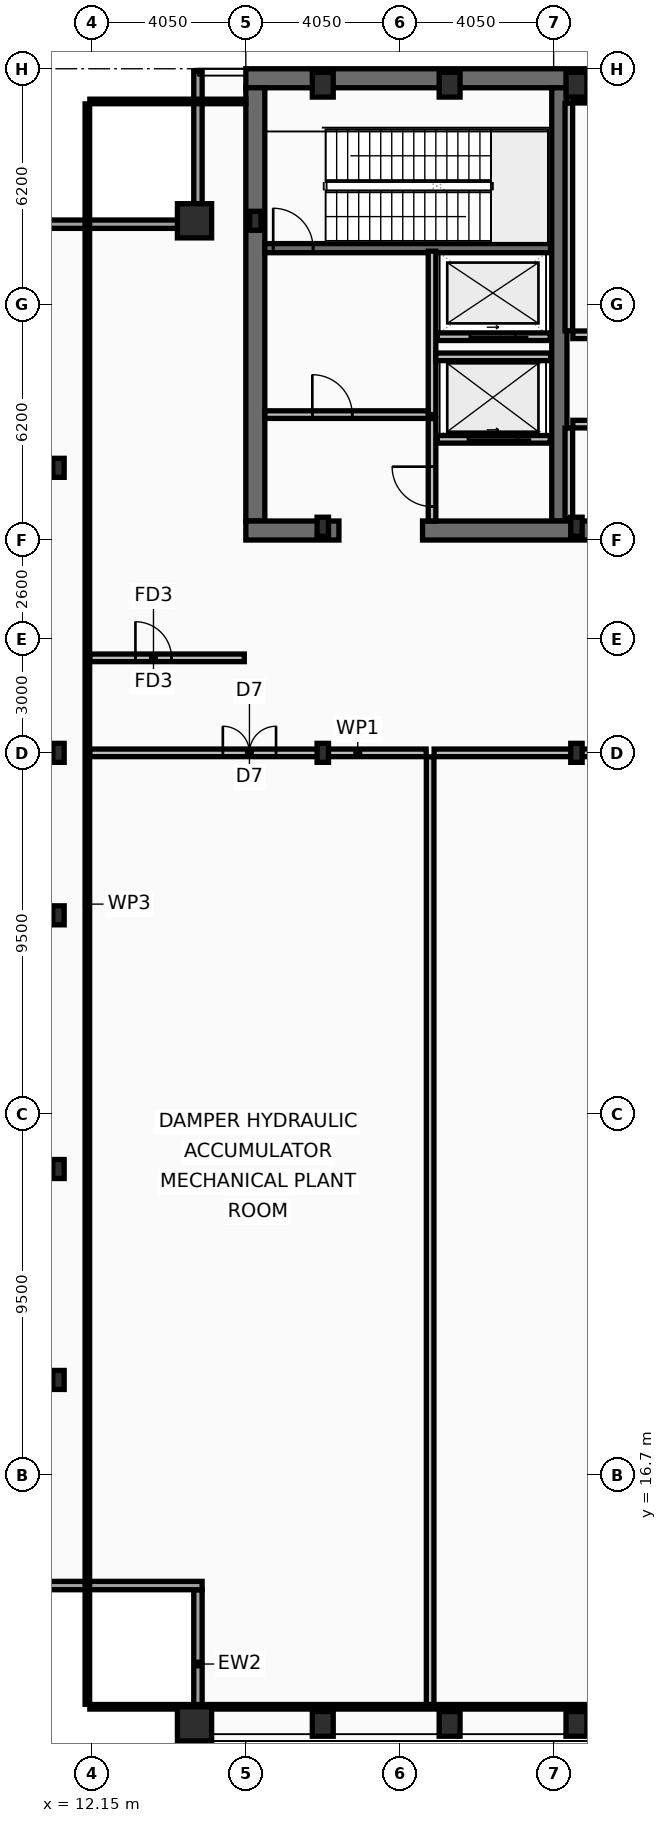
"""IFC4 building model, lengths in metres.
Left out: names, types, materials, properties, quantities, classifications, styles, units other than length and angle.
Written with IfcOpenShell. Run it as: python <this file> out.ifc"""

import sys

from ifc_helpers import new_model, si_unit, direction, frame, frame_2d, origin, origin_2d, place, context, subcontext, project, spatial, rectangle, hollow_rectangle, i_section, extrude, element, fill, save


model = new_model("IFC4")
c1 = context("Model", 3, precision=1e-05, world=origin(), true_north=direction((0.0, 1.0)))
c2 = subcontext(c1, "Body", "Model", "MODEL_VIEW")
j1 = project(units=[si_unit("LENGTHUNIT", "METRE"), si_unit("PLANEANGLEUNIT", "RADIAN")], contexts=[c1])
p1 = place(None, origin())
s1 = spatial("IfcSite", under=j1, at=p1, CompositionType="ELEMENT")
p2 = place(p1, origin())
s2 = spatial("IfcBuilding", under=s1, at=p2, CompositionType="ELEMENT")
p3 = place(p2, frame((0.0, 0.0, 356.2)))
s3 = spatial("IfcBuildingStorey", under=s2, at=p3, CompositionType="ELEMENT", Elevation=356.2)
p4 = place(p3, frame((16.2, 53.45, 0.0), z_axis=(0.0, 0.0, 1.0), x_axis=(1.0, 0.0, 0.0)))
e1 = element("IfcWall", 1, at=p4, inside=s3, PredefinedType="SHEAR", context=c2, shape_type="SweptSolid", body=[
    extrude(rectangle(XDim=40.5, YDim=0.5, at=frame_2d((20.25, 0.0))), origin(), (0.0, 0.0, 1.0), 5.4),
])
p5 = place(p3, frame((16.45, 41.8, 0.0), z_axis=(0.0, 0.0, 1.0), x_axis=(0.0, 1.0, 0.0)))
e2 = element("IfcWall", 2, at=p5, inside=s3, PredefinedType="SHEAR", context=c2, shape_type="SweptSolid", body=[
    extrude(rectangle(XDim=11.4, YDim=0.5, at=frame_2d((5.7, 0.0))), origin(), (0.0, 0.0, 1.0), 5.4),
])
p6 = place(p3, frame((24.45, 41.8, 0.0), z_axis=(0.0, 0.0, 1.0), x_axis=(0.0, 1.0, 0.0)))
e3 = element("IfcWall", 3, at=p6, inside=s3, PredefinedType="SHEAR", context=c2, shape_type="SweptSolid", body=[
    extrude(rectangle(XDim=11.4, YDim=0.4, at=frame_2d((5.7, 0.0))), origin(), (0.0, 0.0, 1.0), 5.4),
])
p7 = place(p3, frame((18.65, 41.55, 0.0), z_axis=(0.0, 0.0, 1.0), x_axis=(-1.0, 0.0, 0.0)))
e4 = element("IfcWall", 4, at=p7, inside=s3, PredefinedType="SHEAR", context=c2, shape_type="SweptSolid", body=[
    extrude(rectangle(XDim=2.45, YDim=0.5, at=frame_2d((1.225, 0.0))), origin(), (0.0, 0.0, 1.0), 5.4),
])
p8 = place(p3, frame((32.3, 41.55, 0.0), z_axis=(0.0, 0.0, 1.0), x_axis=(-1.0, 0.0, 0.0)))
e5 = element("IfcWall", 5, at=p8, inside=s3, PredefinedType="SHEAR", context=c2, shape_type="SweptSolid", body=[
    extrude(rectangle(XDim=11.45, YDim=0.5, at=frame_2d((5.725, 0.0))), origin(), (0.0, 0.0, 1.0), 5.4),
])
p9 = place(p3, frame((16.7, 48.98, 0.0), z_axis=(0.0, 0.0, 1.0), x_axis=(1.0, 0.0, 0.0)))
e6 = element("IfcWall", 6, at=p9, inside=s3, PredefinedType="SHEAR", context=c2, shape_type="SweptSolid", body=[
    extrude(rectangle(XDim=7.52, YDim=0.24, at=frame_2d((3.76, 0.0))), origin(), (0.0, 0.0, 1.0), 5.4),
])
p10 = place(p9, frame((0.22, 0.0, 0.0)))
e7 = element("IfcOpeningElement", 7, at=p10, cuts=e6, PredefinedType="OPENING", context=c2, shape_type="SweptSolid", body=[
    extrude(rectangle(XDim=1.05, YDim=2.15, at=frame_2d((0.525, 1.075))), frame((0.0, 0.13, 0.0), z_axis=(0.0, -1.0, 0.0), x_axis=(1.0, 0.0, 0.0)), (0.0, 0.0, 1.0), 0.26),
])
for number, where, z_axis, x_axis in (
    (8, (14.85, 10.15, 0.0), (0.0, 0.0, 1.0), (1.0, 0.0, 0.0)),
    (9, (14.85, 49.7, 0.0), (0.0, 0.0, 1.0), (1.0, 0.0, 0.0)),
):
    element("IfcColumn", number, at=place(p3, frame(where, z_axis=z_axis, x_axis=x_axis)), inside=s3, PredefinedType="COLUMN", context=c2, shape_type="SweptSolid", body=[
        extrude(hollow_rectangle(XDim=0.9, YDim=0.9, WallThickness=0.05, at=origin_2d()), origin(), (0.0, 0.0, 1.0), 5.6),
    ])
for number, where, z_axis, x_axis in (
    (10, (18.225, 10.15, 0.0), (0.0, 0.0, 1.0), (1.0, 0.0, 0.0)),
    (11, (21.562, 10.15, 0.0), (0.0, 0.0, 1.0), (1.0, 0.0, 0.0)),
    (12, (24.9, 10.15, 0.0), (0.0, 0.0, 1.0), (1.0, 0.0, 0.0)),
    (13, (18.225, 53.28, 0.0), (0.0, 0.0, 1.0), (1.0, 0.0, 0.0)),
    (14, (21.562, 53.28, 0.0), (0.0, 0.0, 1.0), (1.0, 0.0, 0.0)),
    (15, (24.9, 53.28, 0.0), (0.0, 0.0, 1.0), (1.0, 0.0, 0.0)),
):
    element("IfcColumn", number, at=place(p3, frame(where, z_axis=z_axis, x_axis=x_axis)), inside=s3, PredefinedType="COLUMN", context=c2, shape_type="SweptSolid", body=[
        extrude(hollow_rectangle(XDim=0.55, YDim=0.65, WallThickness=0.04, at=origin_2d()), origin(), (0.0, 0.0, 1.0), 5.6),
    ])
for number, where, z_axis, x_axis in (
    (16, (11.27, 19.2, 0.0), (0.0, 0.0, 1.0), (1.0, 0.0, 0.0)),
    (17, (11.27, 24.75, 0.0), (0.0, 0.0, 1.0), (1.0, 0.0, 0.0)),
    (18, (11.27, 31.425, 0.0), (0.0, 0.0, 1.0), (1.0, 0.0, 0.0)),
    (19, (11.27, 35.7, 0.0), (0.0, 0.0, 1.0), (1.0, 0.0, 0.0)),
    (20, (11.27, 43.2, 0.0), (0.0, 0.0, 1.0), (1.0, 0.0, 0.0)),
    (21, (16.45, 49.7, 0.0), (0.0, 0.0, 1.0), (1.0, 0.0, 0.0)),
    (22, (18.225, 35.7, 0.0), (0.0, 0.0, 1.0), (1.0, 0.0, 0.0)),
    (23, (18.225, 41.65, 0.0), (0.0, 0.0, 1.0), (1.0, 0.0, 0.0)),
    (24, (24.9, 35.7, 0.0), (0.0, 0.0, 1.0), (1.0, 0.0, 0.0)),
    (25, (24.9, 41.65, 0.0), (0.0, 0.0, 1.0), (1.0, 0.0, 0.0)),
):
    element("IfcColumn", number, at=place(p3, frame(where, z_axis=z_axis, x_axis=x_axis)), inside=s3, PredefinedType="COLUMN", context=c2, shape_type="SweptSolid", body=[
        extrude(i_section(OverallWidth=0.3, OverallDepth=0.5, WebThickness=0.014, FlangeThickness=0.028, at=origin_2d()), origin(), (0.0, 0.0, 1.0), 5.6),
    ])
p11 = place(p3, frame((14.94, 9.77, 0.0), z_axis=(0.0, 0.0, 1.0), x_axis=(0.0, 1.0, 0.0)))
e26 = element("IfcWall", 26, at=p11, inside=s3, PredefinedType="SOLIDWALL", context=c2, shape_type="SweptSolid", body=[
    extrude(rectangle(XDim=3.91, YDim=0.22, at=frame_2d((1.955, 0.0))), origin(), (0.0, 0.0, 1.0), 4.84),
])
for number, where, z_axis, x_axis in (
    (27, (15.05, 13.79, 0.0), (0.0, 0.0, 1.0), (-1.0, 0.0, 0.0)),
    (28, (10.92, 49.61, 0.0), (0.0, 0.0, 1.0), (1.0, 0.0, 0.0)),
):
    element("IfcWall", number, at=place(p3, frame(where, z_axis=z_axis, x_axis=x_axis)), inside=s3, PredefinedType="SOLIDWALL", context=c2, shape_type="SweptSolid", body=[
        extrude(rectangle(XDim=4.13, YDim=0.22, at=frame_2d((2.065, 0.0))), origin(), (0.0, 0.0, 1.0), 4.84),
    ])
p12 = place(p3, frame((14.94, 49.72, 0.0), z_axis=(0.0, 0.0, 1.0), x_axis=(0.0, 1.0, 0.0)))
e29 = element("IfcWall", 29, at=p12, inside=s3, PredefinedType="SOLIDWALL", context=c2, shape_type="SweptSolid", body=[
    extrude(rectangle(XDim=3.91, YDim=0.22, at=frame_2d((1.955, 0.0))), origin(), (0.0, 0.0, 1.0), 4.84),
])
p13 = place(p3, frame((24.21, 43.95, 0.0), z_axis=(0.0, 0.0, 1.0), x_axis=(-1.0, 0.0, 0.0)))
e30 = element("IfcWall", 30, at=p13, inside=s3, PredefinedType="PARTITIONING", context=c2, shape_type="SweptSolid", body=[
    extrude(rectangle(XDim=2.97, YDim=0.2, at=frame_2d((1.485, 0.0))), origin(), (0.0, 0.0, 1.0), 5.4),
])
p14 = place(p13, frame((0.86, 0.0, 0.0)))
e31 = element("IfcOpeningElement", 31, at=p14, cuts=e30, PredefinedType="OPENING", context=c2, shape_type="SweptSolid", body=[
    extrude(rectangle(XDim=1.3, YDim=2.18, at=frame_2d((0.65, 1.09))), frame((0.0, 0.11, 0.0), z_axis=(0.0, -1.0, 0.0), x_axis=(1.0, 0.0, 0.0)), (0.0, 0.0, 1.0), 0.22),
])
p15 = place(p3, frame((24.21, 46.65, 0.0), z_axis=(0.0, 0.0, 1.0), x_axis=(-1.0, 0.0, 0.0)))
e32 = element("IfcWall", 32, at=p15, inside=s3, PredefinedType="PARTITIONING", context=c2, shape_type="SweptSolid", body=[
    extrude(rectangle(XDim=2.97, YDim=0.2, at=frame_2d((1.485, 0.0))), origin(), (0.0, 0.0, 1.0), 5.4),
])
p16 = place(p15, frame((0.91, 0.0, 0.0)))
e33 = element("IfcOpeningElement", 33, at=p16, cuts=e32, PredefinedType="OPENING", context=c2, shape_type="SweptSolid", body=[
    extrude(rectangle(XDim=1.2, YDim=2.18, at=frame_2d((0.6, 1.09))), frame((0.0, 0.11, 0.0), z_axis=(0.0, -1.0, 0.0), x_axis=(1.0, 0.0, 0.0)), (0.0, 0.0, 1.0), 0.22),
])
p17 = place(p3, frame((21.1, 44.6, 0.0), z_axis=(0.0, 0.0, 1.0), x_axis=(0.0, 1.0, 0.0)))
e34 = element("IfcWall", 34, at=p17, inside=s3, PredefinedType="PARTITIONING", context=c2, shape_type="SweptSolid", body=[
    extrude(rectangle(XDim=4.3, YDim=0.2, at=frame_2d((2.15, 0.0))), origin(), (0.0, 0.0, 1.0), 5.4),
])
p18 = place(p3, frame((16.7, 44.6, 0.0), z_axis=(0.0, 0.0, 1.0), x_axis=(1.0, 0.0, 0.0)))
e35 = element("IfcWall", 35, at=p18, inside=s3, PredefinedType="PARTITIONING", context=c2, shape_type="SweptSolid", body=[
    extrude(rectangle(XDim=4.3, YDim=0.2, at=frame_2d((2.15, 0.0))), origin(), (0.0, 0.0, 1.0), 5.4),
])
p19 = place(p18, frame((1.25, 0.0, 0.0)))
e36 = element("IfcOpeningElement", 36, at=p19, cuts=e35, PredefinedType="OPENING", context=c2, shape_type="SweptSolid", body=[
    extrude(rectangle(XDim=1.05, YDim=2.15, at=frame_2d((0.525, 1.075))), frame((0.0, 0.11, 0.0), z_axis=(0.0, -1.0, 0.0), x_axis=(1.0, 0.0, 0.0)), (0.0, 0.0, 1.0), 0.22),
])
p20 = place(p3, frame((21.2, 46.12, 0.0), z_axis=(0.0, 0.0, 1.0), x_axis=(1.0, 0.0, 0.0)))
e37 = element("IfcWall", 37, at=p20, inside=s3, PredefinedType="PARTITIONING", context=c2, shape_type="SweptSolid", body=[
    extrude(rectangle(XDim=3.02, YDim=0.2, at=frame_2d((1.51, 0.0))), origin(), (0.0, 0.0, 1.0), 5.4),
])
p21 = place(p3, frame((21.1, 41.8, 0.0), z_axis=(0.0, 0.0, 1.0), x_axis=(0.0, 1.0, 0.0)))
e38 = element("IfcWall", 38, at=p21, inside=s3, PredefinedType="PARTITIONING", context=c2, shape_type="SweptSolid", body=[
    extrude(rectangle(XDim=2.695, YDim=0.2, at=frame_2d((1.348, 0.0))), origin(), (0.0, 0.0, 1.0), 5.4),
])
p22 = place(p21, frame((0.38, 0.0, 0.0)))
e39 = element("IfcOpeningElement", 39, at=p22, cuts=e38, PredefinedType="OPENING", context=c2, shape_type="SweptSolid", body=[
    extrude(rectangle(XDim=1.05, YDim=2.15, at=frame_2d((0.525, 1.075))), frame((0.0, 0.11, 0.0), z_axis=(0.0, -1.0, 0.0), x_axis=(1.0, 0.0, 0.0)), (0.0, 0.0, 1.0), 0.22),
])
p23 = place(p3, frame((24.7, 46.805, 0.0), z_axis=(0.0, 0.0, 1.0), x_axis=(0.0, 1.0, 0.0)))
e40 = element("IfcWall", 40, at=p23, inside=s3, PredefinedType="PARTITIONING", context=c2, shape_type="SweptSolid", body=[
    extrude(rectangle(XDim=5.99, YDim=0.2, at=frame_2d((2.995, 0.0))), origin(), (0.0, 0.0, 1.0), 5.4),
])
p24 = place(p3, frame((24.805, 52.86, 0.0), z_axis=(0.0, 0.0, 1.0), x_axis=(1.0, 0.0, 0.0)))
e41 = element("IfcWall", 41, at=p24, inside=s3, PredefinedType="PARTITIONING", context=c2, shape_type="SweptSolid", body=[
    extrude(rectangle(XDim=7.51, YDim=0.12, at=frame_2d((3.755, 0.0))), origin(), (0.0, 0.0, 1.0), 5.4),
])
p25 = place(p3, frame((24.805, 46.7, 0.0), z_axis=(0.0, 0.0, 1.0), x_axis=(1.0, 0.0, 0.0)))
e42 = element("IfcWall", 42, at=p25, inside=s3, PredefinedType="PARTITIONING", context=c2, shape_type="SweptSolid", body=[
    extrude(rectangle(XDim=7.51, YDim=0.2, at=frame_2d((3.755, 0.0))), origin(), (0.0, 0.0, 1.0), 5.4),
])
p26 = place(p25, frame((1.15, 0.0, 0.0)))
e43 = element("IfcOpeningElement", 43, at=p26, cuts=e42, PredefinedType="OPENING", context=c2, shape_type="SweptSolid", body=[
    extrude(rectangle(XDim=0.95, YDim=2.1, at=frame_2d((0.475, 1.05))), frame((0.0, 0.11, 0.0), z_axis=(0.0, -1.0, 0.0), x_axis=(1.0, 0.0, 0.0)), (0.0, 0.0, 1.0), 0.22),
])
p27 = place(p25, frame((5.336, 0.0, 0.0)))
e44 = element("IfcOpeningElement", 44, at=p27, cuts=e42, PredefinedType="OPENING", context=c2, shape_type="SweptSolid", body=[
    extrude(rectangle(XDim=0.95, YDim=2.1, at=frame_2d((0.475, 1.05))), frame((0.0, 0.11, 0.0), z_axis=(0.0, -1.0, 0.0), x_axis=(1.0, 0.0, 0.0)), (0.0, 0.0, 1.0), 0.22),
])
p28 = place(p3, frame((24.7, 41.85, 0.0), z_axis=(0.0, 0.0, 1.0), x_axis=(0.0, 1.0, 0.0)))
e45 = element("IfcWall", 45, at=p28, inside=s3, PredefinedType="PARTITIONING", context=c2, shape_type="SweptSolid", body=[
    extrude(rectangle(XDim=2.395, YDim=0.2, at=frame_2d((1.198, 0.0))), origin(), (0.0, 0.0, 1.0), 5.4),
])
p29 = place(p3, frame((24.805, 44.35, 0.0), z_axis=(0.0, 0.0, 1.0), x_axis=(1.0, 0.0, 0.0)))
e46 = element("IfcWall", 46, at=p29, inside=s3, PredefinedType="PARTITIONING", context=c2, shape_type="SweptSolid", body=[
    extrude(rectangle(XDim=7.34, YDim=0.2, at=frame_2d((3.67, 0.0))), origin(), (0.0, 0.0, 1.0), 5.4),
])
p30 = place(p29, frame((1.15, 0.0, 0.0)))
e47 = element("IfcOpeningElement", 47, at=p30, cuts=e46, PredefinedType="OPENING", context=c2, shape_type="SweptSolid", body=[
    extrude(rectangle(XDim=0.95, YDim=2.1, at=frame_2d((0.475, 1.05))), frame((0.0, 0.11, 0.0), z_axis=(0.0, -1.0, 0.0), x_axis=(1.0, 0.0, 0.0)), (0.0, 0.0, 1.0), 0.22),
])
p31 = place(p29, frame((5.231, 0.0, 0.0)))
e48 = element("IfcOpeningElement", 48, at=p31, cuts=e46, PredefinedType="OPENING", context=c2, shape_type="SweptSolid", body=[
    extrude(rectangle(XDim=0.95, YDim=2.1, at=frame_2d((0.475, 1.05))), frame((0.0, 0.11, 0.0), z_axis=(0.0, -1.0, 0.0), x_axis=(1.0, 0.0, 0.0)), (0.0, 0.0, 1.0), 0.22),
])
p32 = place(p3, frame((12.095, 35.7, 0.0), z_axis=(0.0, 0.0, 1.0), x_axis=(1.0, 0.0, 0.0)))
e49 = element("IfcWall", 49, at=p32, inside=s3, PredefinedType="PARTITIONING", context=c2, shape_type="SweptSolid", body=[
    extrude(rectangle(XDim=8.85, YDim=0.2, at=frame_2d((4.425, 0.0))), origin(), (0.0, 0.0, 1.0), 4.79),
])
p33 = place(p32, frame((3.5, 0.0, 0.0)))
e50 = element("IfcOpeningElement", 50, at=p33, cuts=e49, PredefinedType="OPENING", context=c2, shape_type="SweptSolid", body=[
    extrude(rectangle(XDim=1.4, YDim=2.15, at=frame_2d((0.7, 1.075))), frame((0.0, 0.11, 0.0), z_axis=(0.0, -1.0, 0.0), x_axis=(1.0, 0.0, 0.0)), (0.0, 0.0, 1.0), 0.22),
])
p34 = place(p3, frame((21.155, 35.7, 0.0), z_axis=(0.0, 0.0, 1.0), x_axis=(1.0, 0.0, 0.0)))
e51 = element("IfcWall", 51, at=p34, inside=s3, PredefinedType="PARTITIONING", context=c2, shape_type="SweptSolid", body=[
    extrude(rectangle(XDim=4.19, YDim=0.2, at=frame_2d((2.095, 0.0))), origin(), (0.0, 0.0, 1.0), 4.79),
])
p35 = place(p3, frame((21.05, 10.565, 0.0), z_axis=(0.0, 0.0, 1.0), x_axis=(0.0, 1.0, 0.0)))
e52 = element("IfcWall", 52, at=p35, inside=s3, PredefinedType="PARTITIONING", context=c2, shape_type="SweptSolid", body=[
    extrude(rectangle(XDim=25.03, YDim=0.2, at=frame_2d((12.515, 0.0))), origin(), (0.0, 0.0, 1.0), 4.84),
])
p36 = place(p3, frame((12.095, 38.2, 0.0), z_axis=(0.0, 0.0, 1.0), x_axis=(1.0, 0.0, 0.0)))
e53 = element("IfcWall", 53, at=p36, inside=s3, PredefinedType="PARTITIONING", context=c2, shape_type="SweptSolid", body=[
    extrude(rectangle(XDim=4.065, YDim=0.2, at=frame_2d((2.032, 0.0))), origin(), (0.0, 0.0, 1.0), 5.4),
])
p37 = place(p36, frame((1.2, 0.0, 0.0)))
e54 = element("IfcOpeningElement", 54, at=p37, cuts=e53, PredefinedType="OPENING", context=c2, shape_type="SweptSolid", body=[
    extrude(rectangle(XDim=0.95, YDim=2.1, at=frame_2d((0.475, 1.05))), frame((0.0, 0.11, 0.0), z_axis=(0.0, -1.0, 0.0), x_axis=(1.0, 0.0, 0.0)), (0.0, 0.0, 1.0), 0.22),
])
p38 = place(p3, frame((12.03, 10.665, 0.0), z_axis=(0.0, 0.0, 1.0), x_axis=(0.0, 1.0, 0.0)))
e55 = element("IfcWall", 55, at=p38, inside=s3, PredefinedType="PARTITIONING", context=c2, shape_type="SweptSolid", body=[
    extrude(rectangle(XDim=42.11, YDim=0.12, at=frame_2d((21.055, 0.0))), origin(), (0.0, 0.0, 1.0), 4.79),
])
p39 = place(p3, frame((12.095, 52.84, 0.0), z_axis=(0.0, 0.0, 1.0), x_axis=(1.0, 0.0, 0.0)))
e56 = element("IfcWall", 56, at=p39, inside=s3, PredefinedType="PARTITIONING", context=c2, shape_type="SweptSolid", body=[
    extrude(rectangle(XDim=4.105, YDim=0.12, at=frame_2d((2.052, 0.0))), origin(), (0.0, 0.0, 1.0), 5.4),
])
p40 = place(p3, frame((12.095, 10.6, 0.0), z_axis=(0.0, 0.0, 1.0), x_axis=(1.0, 0.0, 0.0)))
e57 = element("IfcWall", 57, at=p40, inside=s3, PredefinedType="PARTITIONING", context=c2, shape_type="SweptSolid", body=[
    extrude(rectangle(XDim=48.71, YDim=0.12, at=frame_2d((24.355, 0.0))), origin(), (0.0, 0.0, 1.0), 4.79),
])
p41 = place(p10, origin())
e58 = element("IfcDoor", 58, at=p41, inside=s3, OperationType="SINGLE_SWING_LEFT", PredefinedType="DOOR", context=c2, shape_type="SweptSolid", body=[
    extrude(rectangle(XDim=1.05, YDim=2.15, at=frame_2d((0.525, 1.075))), frame((0.0, 0.025, 0.0), z_axis=(0.0, -1.0, 0.0), x_axis=(1.0, 0.0, 0.0)), (0.0, 0.0, 1.0), 0.05),
])
fill(e7, e58)
p42 = place(p14, origin())
e59 = element("IfcDoor", 59, at=p42, inside=s3, OperationType="SLIDING_TO_LEFT", PredefinedType="DOOR", context=c2, shape_type="SweptSolid", body=[
    extrude(rectangle(XDim=1.3, YDim=2.18, at=frame_2d((0.65, 1.09))), frame((0.0, 0.025, 0.0), z_axis=(0.0, -1.0, 0.0), x_axis=(1.0, 0.0, 0.0)), (0.0, 0.0, 1.0), 0.05),
])
fill(e31, e59)
p43 = place(p16, origin())
e60 = element("IfcDoor", 60, at=p43, inside=s3, OperationType="SLIDING_TO_LEFT", PredefinedType="DOOR", context=c2, shape_type="SweptSolid", body=[
    extrude(rectangle(XDim=1.2, YDim=2.18, at=frame_2d((0.6, 1.09))), frame((0.0, 0.025, 0.0), z_axis=(0.0, -1.0, 0.0), x_axis=(1.0, 0.0, 0.0)), (0.0, 0.0, 1.0), 0.05),
])
fill(e33, e60)
p44 = place(p19, origin())
e61 = element("IfcDoor", 61, at=p44, inside=s3, OperationType="SINGLE_SWING_LEFT", PredefinedType="DOOR", context=c2, shape_type="SweptSolid", body=[
    extrude(rectangle(XDim=1.05, YDim=2.15, at=frame_2d((0.525, 1.075))), frame((0.0, 0.025, 0.0), z_axis=(0.0, -1.0, 0.0), x_axis=(1.0, 0.0, 0.0)), (0.0, 0.0, 1.0), 0.05),
])
fill(e36, e61)
p45 = place(p22, origin())
e62 = element("IfcDoor", 62, at=p45, inside=s3, OperationType="SINGLE_SWING_RIGHT", PredefinedType="DOOR", context=c2, shape_type="SweptSolid", body=[
    extrude(rectangle(XDim=1.05, YDim=2.15, at=frame_2d((0.525, 1.075))), frame((0.0, 0.025, 0.0), z_axis=(0.0, -1.0, 0.0), x_axis=(1.0, 0.0, 0.0)), (0.0, 0.0, 1.0), 0.05),
])
fill(e39, e62)
p46 = place(p33, origin())
e63 = element("IfcDoor", 63, at=p46, inside=s3, OperationType="DOUBLE_DOOR_SINGLE_SWING", PredefinedType="DOOR", context=c2, shape_type="SweptSolid", body=[
    extrude(rectangle(XDim=1.4, YDim=2.15, at=frame_2d((0.7, 1.075))), frame((0.0, 0.025, 0.0), z_axis=(0.0, -1.0, 0.0), x_axis=(1.0, 0.0, 0.0)), (0.0, 0.0, 1.0), 0.05),
])
fill(e50, e63)
p47 = place(p37, origin())
e64 = element("IfcDoor", 64, at=p47, inside=s3, OperationType="SINGLE_SWING_LEFT", PredefinedType="DOOR", context=c2, shape_type="SweptSolid", body=[
    extrude(rectangle(XDim=0.95, YDim=2.1, at=frame_2d((0.475, 1.05))), frame((0.0, 0.025, 0.0), z_axis=(0.0, -1.0, 0.0), x_axis=(1.0, 0.0, 0.0)), (0.0, 0.0, 1.0), 0.05),
])
fill(e54, e64)
save(model, sys.argv[1])
